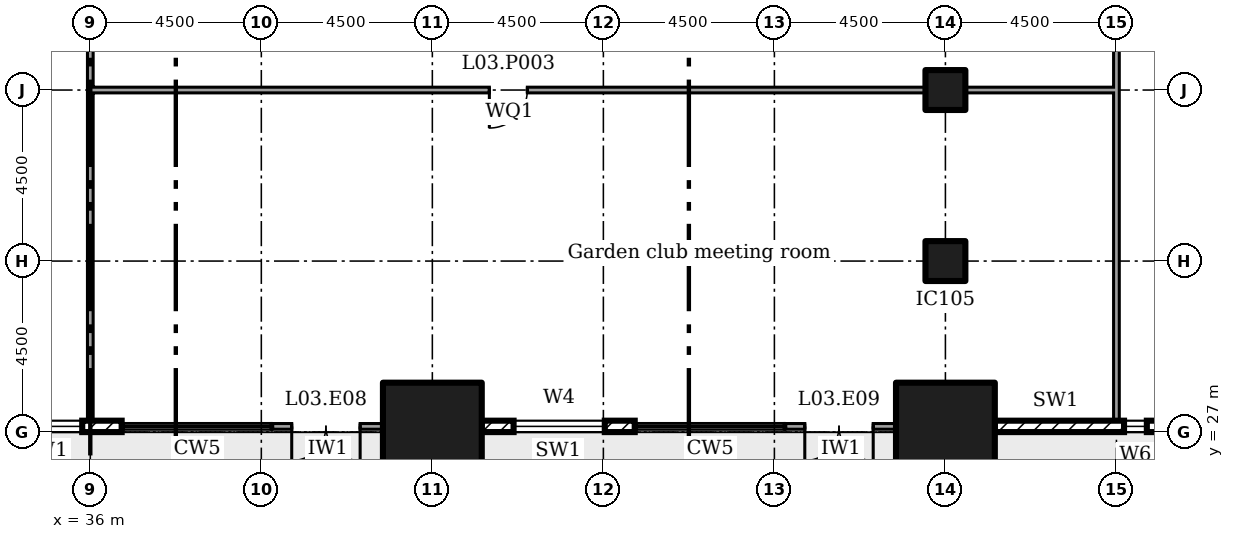
"""IFC4 building model, lengths in metres.
Left out: names, types, materials, properties, quantities, classifications, styles, units other than length and angle.
Written with IfcOpenShell. Run it as: python <this file> out.ifc"""

import sys

from ifc_helpers import new_model, si_unit, direction, frame, frame_2d, origin, origin_2d, place, context, subcontext, project, spatial, rectangle, extrude, element, fill, save


model = new_model("IFC4")
c1 = context("Model", 3, precision=1e-05, world=origin(), true_north=direction((0.0, 1.0)))
c2 = subcontext(c1, "Body", "Model", "MODEL_VIEW")
j1 = project(units=[si_unit("LENGTHUNIT", "METRE"), si_unit("PLANEANGLEUNIT", "RADIAN")], contexts=[c1])
p1 = place(None, origin())
s1 = spatial("IfcSite", under=j1, at=p1, CompositionType="ELEMENT")
p2 = place(p1, origin())
s2 = spatial("IfcBuilding", under=s1, at=p2, CompositionType="ELEMENT")
p3 = place(p2, frame((0.0, 0.0, 16.5)))
s3 = spatial("IfcBuildingStorey", under=s2, at=p3, CompositionType="ELEMENT", Elevation=16.5)
for number, where in (
    (1, (45.0, 27.0, 0.0)),
    (2, (58.5, 27.0, 0.0)),
):
    element("IfcColumn", number, at=place(p3, frame(where)), inside=s3, PredefinedType="COLUMN", context=c2, shape_type="SweptSolid", body=[
        extrude(rectangle(XDim=2.6, YDim=2.6, at=origin_2d()), origin(), (0.0, 0.0, 1.0), 4.5),
    ])
for number, where in (
    (3, (58.5, 31.5, 0.0)),
    (4, (58.5, 36.0, 0.0)),
):
    element("IfcColumn", number, at=place(p3, frame(where)), inside=s3, PredefinedType="COLUMN", context=c2, shape_type="SweptSolid", body=[
        extrude(rectangle(XDim=1.05, YDim=1.05, at=origin_2d()), origin(), (0.0, 0.0, 1.0), 4.5),
    ])
p4 = place(p3, frame((32.8, 27.15, 0.0)))
e5 = element("IfcWall", 5, at=p4, inside=s3, PredefinedType="ELEMENTEDWALL", context=c2, shape_type="SweptSolid", body=[
    extrude(rectangle(XDim=4.025, YDim=0.3, at=frame_2d((2.012, 0.0))), origin(), (0.0, 0.0, 1.0), 2.25),
])
p5 = place(p4, frame((0.587, 0.0, 0.45)))
e6 = element("IfcOpeningElement", 6, at=p5, cuts=e5, PredefinedType="OPENING", context=c2, shape_type="SweptSolid", body=[
    extrude(rectangle(XDim=2.4, YDim=1.7, at=frame_2d((1.2, 0.85))), frame((0.0, 0.16, 0.0), z_axis=(0.0, -1.0, 0.0), x_axis=(1.0, 0.0, 0.0)), (0.0, 0.0, 1.0), 0.32),
])
p6 = place(p3, frame((40.8, 27.15, 0.0)))
e7 = element("IfcWall", 7, at=p6, inside=s3, PredefinedType="SOLIDWALL", context=c2, shape_type="SweptSolid", body=[
    extrude(rectangle(XDim=2.9, YDim=0.15, at=frame_2d((1.45, 0.0))), origin(), (0.0, 0.0, 1.0), 2.25),
])
p7 = place(p6, frame((0.5, 0.0, 0.0)))
e8 = element("IfcOpeningElement", 8, at=p7, cuts=e7, PredefinedType="OPENING", context=c2, shape_type="SweptSolid", body=[
    extrude(rectangle(XDim=1.8, YDim=2.1, at=frame_2d((0.9, 1.05))), frame((0.0, 0.085, 0.0), z_axis=(0.0, -1.0, 0.0), x_axis=(1.0, 0.0, 0.0)), (0.0, 0.0, 1.0), 0.17),
])
p8 = place(p3, frame((46.3, 27.15, 0.0)))
e9 = element("IfcWall", 9, at=p8, inside=s3, PredefinedType="ELEMENTEDWALL", context=c2, shape_type="SweptSolid", body=[
    extrude(rectangle(XDim=4.025, YDim=0.3, at=frame_2d((2.012, 0.0))), origin(), (0.0, 0.0, 1.0), 2.25),
])
p9 = place(p8, frame((0.837, 0.0, 0.45)))
e10 = element("IfcOpeningElement", 10, at=p9, cuts=e9, PredefinedType="OPENING", context=c2, shape_type="SweptSolid", body=[
    extrude(rectangle(XDim=2.4, YDim=1.7, at=frame_2d((1.2, 0.85))), frame((0.0, 0.16, 0.0), z_axis=(0.0, -1.0, 0.0), x_axis=(1.0, 0.0, 0.0)), (0.0, 0.0, 1.0), 0.32),
])
p10 = place(p3, frame((54.3, 27.15, 0.0)))
e11 = element("IfcWall", 11, at=p10, inside=s3, PredefinedType="SOLIDWALL", context=c2, shape_type="SweptSolid", body=[
    extrude(rectangle(XDim=2.9, YDim=0.15, at=frame_2d((1.45, 0.0))), origin(), (0.0, 0.0, 1.0), 2.25),
])
p11 = place(p10, frame((0.5, 0.0, 0.0)))
e12 = element("IfcOpeningElement", 12, at=p11, cuts=e11, PredefinedType="OPENING", context=c2, shape_type="SweptSolid", body=[
    extrude(rectangle(XDim=1.8, YDim=2.1, at=frame_2d((0.9, 1.05))), frame((0.0, 0.085, 0.0), z_axis=(0.0, -1.0, 0.0), x_axis=(1.0, 0.0, 0.0)), (0.0, 0.0, 1.0), 0.17),
])
p12 = place(p3, frame((59.8, 27.15, 0.0)))
e13 = element("IfcWall", 13, at=p12, inside=s3, PredefinedType="ELEMENTEDWALL", context=c2, shape_type="SweptSolid", body=[
    extrude(rectangle(XDim=6.4, YDim=0.3, at=frame_2d((3.2, 0.0))), origin(), (0.0, 0.0, 1.0), 2.25),
])
p13 = place(p12, frame((3.4, 0.0, 0.45)))
e14 = element("IfcOpeningElement", 14, at=p13, cuts=e13, PredefinedType="OPENING", context=c2, shape_type="SweptSolid", body=[
    extrude(rectangle(XDim=0.6, YDim=1.7, at=frame_2d((0.3, 0.85))), frame((0.0, 0.16, 0.0), z_axis=(0.0, -1.0, 0.0), x_axis=(1.0, 0.0, 0.0)), (0.0, 0.0, 1.0), 0.32),
])
p14 = place(p3, frame((63.0, 35.925, 0.0), z_axis=(0.0, 0.0, 1.0), x_axis=(0.0, 1.0, 0.0)))
e15 = element("IfcWall", 15, at=p14, inside=s3, PredefinedType="PARTITIONING", context=c2, shape_type="SweptSolid", body=[
    extrude(rectangle(XDim=22.055, YDim=0.15, at=frame_2d((11.027, 0.0))), origin(), (0.0, 0.0, 1.0), 4.05),
])
p15 = place(p14, frame((10.175, 0.0, 0.0)))
e16 = element("IfcOpeningElement", 16, at=p15, cuts=e15, PredefinedType="OPENING", context=c2, shape_type="SweptSolid", body=[
    extrude(rectangle(XDim=1.8, YDim=2.1, at=frame_2d((0.9, 1.05))), frame((0.0, 0.085, 0.0), z_axis=(0.0, -1.0, 0.0), x_axis=(1.0, 0.0, 0.0)), (0.0, 0.0, 1.0), 0.17),
])
p16 = place(p3, frame((63.0, 27.3, 0.0), z_axis=(0.0, 0.0, 1.0), x_axis=(0.0, 1.0, 0.0)))
e17 = element("IfcWall", 17, at=p16, inside=s3, PredefinedType="PARTITIONING", context=c2, shape_type="SweptSolid", body=[
    extrude(rectangle(XDim=8.7, YDim=0.15, at=frame_2d((4.35, 0.0))), origin(), (0.0, 0.0, 1.0), 4.05),
])
p17 = place(p3, frame((36.0, 35.925, 0.0), z_axis=(0.0, 0.0, 1.0), x_axis=(0.0, 1.0, 0.0)))
e18 = element("IfcWall", 18, at=p17, inside=s3, PredefinedType="PARTITIONING", context=c2, shape_type="SweptSolid", body=[
    extrude(rectangle(XDim=4.055, YDim=0.15, at=frame_2d((2.027, 0.0))), origin(), (0.0, 0.0, 1.0), 4.05),
])
p18 = place(p3, frame((36.075, 36.0, 0.0)))
e19 = element("IfcWall", 19, at=p18, inside=s3, PredefinedType="PARTITIONING", context=c2, shape_type="SweptSolid", body=[
    extrude(rectangle(XDim=21.905, YDim=0.15, at=frame_2d((10.953, 0.0))), origin(), (0.0, 0.0, 1.0), 4.05),
])
p19 = place(p18, frame((10.425, 0.0, 0.0)))
e20 = element("IfcOpeningElement", 20, at=p19, cuts=e19, PredefinedType="OPENING", context=c2, shape_type="SweptSolid", body=[
    extrude(rectangle(XDim=1.0, YDim=2.1, at=frame_2d((0.5, 1.05))), frame((0.0, 0.085, 0.0), z_axis=(0.0, -1.0, 0.0), x_axis=(1.0, 0.0, 0.0)), (0.0, 0.0, 1.0), 0.17),
])
p20 = place(p3, frame((59.02, 36.0, 0.0)))
e21 = element("IfcWall", 21, at=p20, inside=s3, PredefinedType="PARTITIONING", context=c2, shape_type="SweptSolid", body=[
    extrude(rectangle(XDim=3.905, YDim=0.15, at=frame_2d((1.953, 0.0))), origin(), (0.0, 0.0, 1.0), 4.05),
])
p21 = place(p3, frame((36.0, 27.3, 0.0), z_axis=(0.0, 0.0, 1.0), x_axis=(0.0, 1.0, 0.0)))
e22 = element("IfcWall", 22, at=p21, inside=s3, PredefinedType="PARTITIONING", context=c2, shape_type="SweptSolid", body=[
    extrude(rectangle(XDim=8.7, YDim=0.15, at=frame_2d((4.35, 0.0))), origin(), (0.0, 0.0, 1.0), 4.05),
])
p22 = place(p5, origin())
e23 = element("IfcWindow", 23, at=p22, inside=s3, PartitioningType="SINGLE_PANEL", PredefinedType="WINDOW", context=c2, shape_type="SweptSolid", body=[
    extrude(rectangle(XDim=2.4, YDim=1.7, at=frame_2d((1.2, 0.85))), frame((0.0, 0.03, 0.0), z_axis=(0.0, -1.0, 0.0), x_axis=(1.0, 0.0, 0.0)), (0.0, 0.0, 1.0), 0.06),
])
fill(e6, e23)
p23 = place(p7, frame((1.8, 0.0, 0.0), x_axis=(-1.0, 0.0, 0.0)))
e24 = element("IfcDoor", 24, at=p23, inside=s3, OperationType="DOUBLE_DOOR_DOUBLE_SWING", PredefinedType="NOTDEFINED", context=c2, shape_type="SweptSolid", body=[
    extrude(rectangle(XDim=1.8, YDim=2.1, at=frame_2d((0.9, 1.05))), frame((0.0, 0.025, 0.0), z_axis=(0.0, -1.0, 0.0), x_axis=(1.0, 0.0, 0.0)), (0.0, 0.0, 1.0), 0.05),
])
fill(e8, e24)
p24 = place(p9, origin())
e25 = element("IfcWindow", 25, at=p24, inside=s3, PartitioningType="SINGLE_PANEL", PredefinedType="WINDOW", context=c2, shape_type="SweptSolid", body=[
    extrude(rectangle(XDim=2.4, YDim=1.7, at=frame_2d((1.2, 0.85))), frame((0.0, 0.03, 0.0), z_axis=(0.0, -1.0, 0.0), x_axis=(1.0, 0.0, 0.0)), (0.0, 0.0, 1.0), 0.06),
])
fill(e10, e25)
p25 = place(p11, frame((1.8, 0.0, 0.0), x_axis=(-1.0, 0.0, 0.0)))
e26 = element("IfcDoor", 26, at=p25, inside=s3, OperationType="DOUBLE_DOOR_DOUBLE_SWING", PredefinedType="NOTDEFINED", context=c2, shape_type="SweptSolid", body=[
    extrude(rectangle(XDim=1.8, YDim=2.1, at=frame_2d((0.9, 1.05))), frame((0.0, 0.025, 0.0), z_axis=(0.0, -1.0, 0.0), x_axis=(1.0, 0.0, 0.0)), (0.0, 0.0, 1.0), 0.05),
])
fill(e12, e26)
p26 = place(p13, origin())
e27 = element("IfcWindow", 27, at=p26, inside=s3, PartitioningType="SINGLE_PANEL", PredefinedType="WINDOW", context=c2, shape_type="SweptSolid", body=[
    extrude(rectangle(XDim=0.6, YDim=1.7, at=frame_2d((0.3, 0.85))), frame((0.0, 0.03, 0.0), z_axis=(0.0, -1.0, 0.0), x_axis=(1.0, 0.0, 0.0)), (0.0, 0.0, 1.0), 0.06),
])
fill(e14, e27)
p27 = place(p19, frame((1.0, 0.0, 0.0), x_axis=(-1.0, 0.0, 0.0)))
e28 = element("IfcDoor", 28, at=p27, inside=s3, OperationType="SINGLE_SWING_LEFT", PredefinedType="DOOR", context=c2, shape_type="SweptSolid", body=[
    extrude(rectangle(XDim=1.0, YDim=2.1, at=frame_2d((0.5, 1.05))), frame((0.0, 0.025, 0.0), z_axis=(0.0, -1.0, 0.0), x_axis=(1.0, 0.0, 0.0)), (0.0, 0.0, 1.0), 0.05),
])
fill(e20, e28)
save(model, sys.argv[1])
